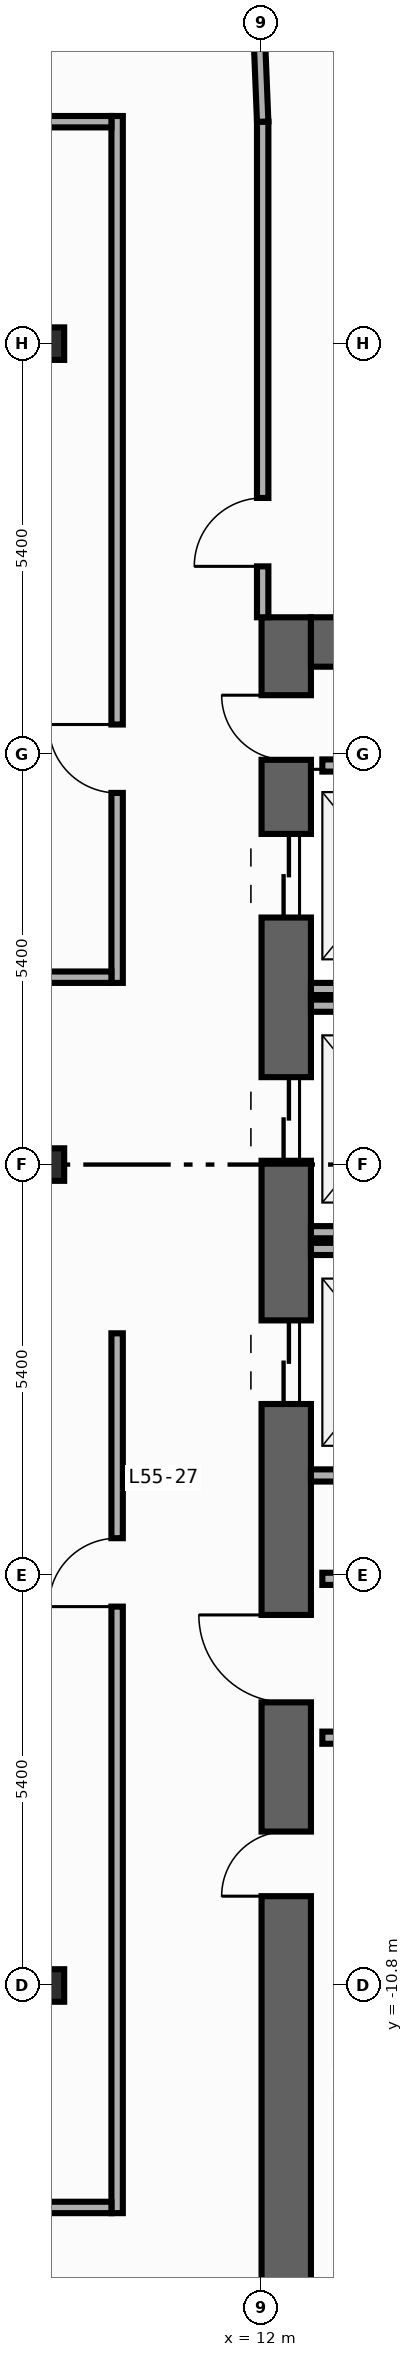
"""IFC4 building model, lengths in metres.
Left out: names, types, materials, properties, quantities, classifications, styles, units other than length and angle.
Written with IfcOpenShell. Run it as: python <this file> out.ifc"""

import sys

from ifc_helpers import new_model, si_unit, direction, frame, frame_2d, origin, origin_2d, place, context, subcontext, project, spatial, rectangle, i_section, extrude, element, fill, save


model = new_model("IFC4")
c1 = context("Model", 3, precision=1e-05, world=origin(), true_north=direction((0.0, 1.0)))
c2 = subcontext(c1, "Body", "Model", "MODEL_VIEW")
j1 = project(units=[si_unit("LENGTHUNIT", "METRE"), si_unit("PLANEANGLEUNIT", "RADIAN")], contexts=[c1])
p1 = place(None, origin())
s1 = spatial("IfcSite", under=j1, at=p1, CompositionType="ELEMENT")
p2 = place(p1, origin())
s2 = spatial("IfcBuilding", under=s1, at=p2, CompositionType="ELEMENT")
p3 = place(p2, frame((0.0, 0.0, 236.8)))
s3 = spatial("IfcBuildingStorey", under=s2, at=p3, CompositionType="ELEMENT", Elevation=236.8)
p4 = place(p3, frame((12.325, -19.8, 0.0), z_axis=(0.0, 0.0, 1.0), x_axis=(0.0, 1.0, 0.0)))
e1 = element("IfcWall", 1, at=p4, inside=s3, PredefinedType="SHEAR", context=c2, shape_type="SweptSolid", body=[
    extrude(rectangle(XDim=27.0, YDim=0.65, at=frame_2d((13.5, 0.0))), origin(), (0.0, 0.0, 1.0), 3.34),
])
p5 = place(p4, frame((23.05, 0.0, 0.0)))
e2 = element("IfcOpeningElement", 2, at=p5, cuts=e1, PredefinedType="OPENING", context=c2, shape_type="SweptSolid", body=[
    extrude(rectangle(XDim=1.1, YDim=2.2, at=frame_2d((0.55, 1.1))), frame((0.0, 0.335, 0.0), z_axis=(0.0, -1.0, 0.0), x_axis=(1.0, 0.0, 0.0)), (0.0, 0.0, 1.0), 0.67),
])
p6 = place(p4, frame((19.85, 0.0, 0.0)))
e3 = element("IfcOpeningElement", 3, at=p6, cuts=e1, PredefinedType="OPENING", context=c2, shape_type="SweptSolid", body=[
    extrude(rectangle(XDim=1.1, YDim=2.2, at=frame_2d((0.55, 1.1))), frame((0.0, 0.335, 0.0), z_axis=(0.0, -1.0, 0.0), x_axis=(1.0, 0.0, 0.0)), (0.0, 0.0, 1.0), 0.67),
])
p7 = place(p4, frame((16.65, 0.0, 0.0)))
e4 = element("IfcOpeningElement", 4, at=p7, cuts=e1, PredefinedType="OPENING", context=c2, shape_type="SweptSolid", body=[
    extrude(rectangle(XDim=1.1, YDim=2.2, at=frame_2d((0.55, 1.1))), frame((0.0, 0.335, 0.0), z_axis=(0.0, -1.0, 0.0), x_axis=(1.0, 0.0, 0.0)), (0.0, 0.0, 1.0), 0.67),
])
p8 = place(p4, frame((10.175, 0.0, 0.0)))
e5 = element("IfcOpeningElement", 5, at=p8, cuts=e1, PredefinedType="OPENING", context=c2, shape_type="SweptSolid", body=[
    extrude(rectangle(XDim=0.85, YDim=2.1, at=frame_2d((0.425, 1.05))), frame((0.0, 0.335, 0.0), z_axis=(0.0, -1.0, 0.0), x_axis=(1.0, 0.0, 0.0)), (0.0, 0.0, 1.0), 0.67),
])
p9 = place(p4, frame((12.725, 0.0, 0.0)))
e6 = element("IfcOpeningElement", 6, at=p9, cuts=e1, PredefinedType="OPENING", context=c2, shape_type="SweptSolid", body=[
    extrude(rectangle(XDim=1.15, YDim=2.2, at=frame_2d((0.575, 1.1))), frame((0.0, 0.335, 0.0), z_axis=(0.0, -1.0, 0.0), x_axis=(1.0, 0.0, 0.0)), (0.0, 0.0, 1.0), 0.67),
])
p10 = place(p4, frame((25.125, 0.0, 0.0)))
e7 = element("IfcOpeningElement", 7, at=p10, cuts=e1, PredefinedType="OPENING", context=c2, shape_type="SweptSolid", body=[
    extrude(rectangle(XDim=0.85, YDim=2.1, at=frame_2d((0.425, 1.05))), frame((0.0, 0.335, 0.0), z_axis=(0.0, -1.0, 0.0), x_axis=(1.0, 0.0, 0.0)), (0.0, 0.0, 1.0), 0.67),
])
p11 = place(p3, frame((12.65, 6.875, 0.0), z_axis=(0.0, 0.0, 1.0), x_axis=(1.0, 0.0, 0.0)))
e8 = element("IfcWall", 8, at=p11, inside=s3, PredefinedType="SHEAR", context=c2, shape_type="SweptSolid", body=[
    extrude(rectangle(XDim=7.1, YDim=0.65, at=frame_2d((3.55, 0.0))), origin(), (0.0, 0.0, 1.0), 3.34),
])
for number, where, z_axis, x_axis in (
    (9, (9.2, -10.8, 0.0), (0.0, 0.0, 1.0), (1.0, 0.0, 0.0)),
    (10, (9.2, 0.0, 0.0), (0.0, 0.0, 1.0), (1.0, 0.0, 0.0)),
    (11, (9.2, 10.8, 0.0), (0.0, 0.0, 1.0), (1.0, 0.0, 0.0)),
):
    element("IfcColumn", number, at=place(p3, frame(where, z_axis=z_axis, x_axis=x_axis)), inside=s3, PredefinedType="COLUMN", context=c2, shape_type="SweptSolid", body=[
        extrude(i_section(OverallWidth=0.407, OverallDepth=0.428, WebThickness=0.02, FlangeThickness=0.035, FilletRadius=0.022, at=origin_2d()), origin(), (0.0, 0.0, 1.0), 3.6),
    ])
for number, where, z_axis, x_axis in (
    (12, (12.65, 2.31, 0.0), (0.0, 0.0, 1.0), (1.0, 0.0, 0.0)),
    (13, (12.65, -0.89, 0.0), (0.0, 0.0, 1.0), (1.0, 0.0, 0.0)),
    (14, (12.65, 2.09, 0.0), (0.0, 0.0, 1.0), (1.0, 0.0, 0.0)),
    (15, (12.65, -4.09, 0.0), (0.0, 0.0, 1.0), (1.0, 0.0, 0.0)),
    (16, (12.65, -1.11, 0.0), (0.0, 0.0, 1.0), (1.0, 0.0, 0.0)),
):
    element("IfcWall", number, at=place(p3, frame(where, z_axis=z_axis, x_axis=x_axis)), inside=s3, PredefinedType="STANDARD", context=c2, shape_type="SweptSolid", body=[
        extrude(rectangle(XDim=2.34, YDim=0.16, at=frame_2d((1.17, 0.0))), origin(), (0.0, 0.0, 1.0), 3.34),
    ])
for number, where, z_axis, x_axis in (
    (17, (12.8, -5.45, 0.0), (0.0, 0.0, 1.0), (1.0, 0.0, 0.0)),
    (18, (12.8, -7.54, 0.0), (0.0, 0.0, 1.0), (1.0, 0.0, 0.0)),
    (19, (12.8, 5.25, 0.0), (0.0, 0.0, 1.0), (1.0, 0.0, 0.0)),
):
    element("IfcWall", number, at=place(p3, frame(where, z_axis=z_axis, x_axis=x_axis)), inside=s3, PredefinedType="STANDARD", context=c2, shape_type="SweptSolid", body=[
        extrude(rectangle(XDim=2.6, YDim=0.16, at=frame_2d((1.3, 0.0))), origin(), (0.0, 0.0, 1.0), 3.34),
    ])
p12 = place(p3, frame((12.015, 7.2, 0.0), z_axis=(0.0, 0.0, 1.0), x_axis=(0.0, 1.0, 0.0)))
e20 = element("IfcWall", 20, at=p12, inside=s3, PredefinedType="PARTITIONING", context=c2, shape_type="SweptSolid", body=[
    extrude(rectangle(XDim=6.52, YDim=0.15, at=frame_2d((3.26, 0.0))), origin(), (0.0, 0.0, 1.0), 3.34),
])
p13 = place(p12, frame((0.67, 0.0, 0.0)))
e21 = element("IfcOpeningElement", 21, at=p13, cuts=e20, PredefinedType="OPENING", context=c2, shape_type="SweptSolid", body=[
    extrude(rectangle(XDim=0.9, YDim=2.15, at=frame_2d((0.45, 1.075))), frame((0.0, 0.085, 0.0), z_axis=(0.0, -1.0, 0.0), x_axis=(1.0, 0.0, 0.0)), (0.0, 0.0, 1.0), 0.17),
])
p14 = place(p3, frame((10.1, 2.39, 0.0), z_axis=(0.0, 0.0, 1.0), x_axis=(0.0, 1.0, 0.0)))
e22 = element("IfcWall", 22, at=p14, inside=s3, PredefinedType="PARTITIONING", context=c2, shape_type="SweptSolid", body=[
    extrude(rectangle(XDim=11.405, YDim=0.15, at=frame_2d((5.703, 0.0))), origin(), (0.0, 0.0, 1.0), 3.34),
])
p15 = place(p14, frame((2.5, 0.0, 0.0)))
e23 = element("IfcOpeningElement", 23, at=p15, cuts=e22, PredefinedType="OPENING", context=c2, shape_type="SweptSolid", body=[
    extrude(rectangle(XDim=0.9, YDim=2.15, at=frame_2d((0.45, 1.075))), frame((0.0, 0.085, 0.0), z_axis=(0.0, -1.0, 0.0), x_axis=(1.0, 0.0, 0.0)), (0.0, 0.0, 1.0), 0.17),
])
p16 = place(p3, frame((10.1, -13.795, 0.0), z_axis=(0.0, 0.0, 1.0), x_axis=(0.0, 1.0, 0.0)))
e24 = element("IfcWall", 24, at=p16, inside=s3, PredefinedType="PARTITIONING", context=c2, shape_type="SweptSolid", body=[
    extrude(rectangle(XDim=11.575, YDim=0.15, at=frame_2d((5.788, 0.0))), origin(), (0.0, 0.0, 1.0), 3.34),
])
p17 = place(p16, frame((7.979, 0.0, 0.0)))
e25 = element("IfcOpeningElement", 25, at=p17, cuts=e24, PredefinedType="OPENING", context=c2, shape_type="SweptSolid", body=[
    extrude(rectangle(XDim=0.9, YDim=2.15, at=frame_2d((0.45, 1.075))), frame((0.0, 0.085, 0.0), z_axis=(0.0, -1.0, 0.0), x_axis=(1.0, 0.0, 0.0)), (0.0, 0.0, 1.0), 0.17),
])
p18 = place(p3, frame((2.77, 2.465, 0.0), z_axis=(0.0, 0.0, 1.0), x_axis=(1.0, 0.0, 0.0)))
e26 = element("IfcWall", 26, at=p18, inside=s3, PredefinedType="PARTITIONING", context=c2, shape_type="SweptSolid", body=[
    extrude(rectangle(XDim=7.255, YDim=0.15, at=frame_2d((3.627, 0.0))), origin(), (0.0, 0.0, 1.0), 3.34),
])
p19 = place(p18, frame((0.46, 0.0, 0.0)))
e27 = element("IfcOpeningElement", 27, at=p19, cuts=e26, PredefinedType="OPENING", context=c2, shape_type="SweptSolid", body=[
    extrude(rectangle(XDim=0.9, YDim=2.15, at=frame_2d((0.45, 1.075))), frame((0.0, 0.085, 0.0), z_axis=(0.0, -1.0, 0.0), x_axis=(1.0, 0.0, 0.0)), (0.0, 0.0, 1.0), 0.17),
])
p20 = place(p3, frame((12.015, 13.72, 0.0), z_axis=(0.0, 0.0, 1.0), x_axis=(-0.040046877756, 0.99919780203, 0.0)))
e28 = element("IfcWall", 28, at=p20, inside=s3, PredefinedType="PARTITIONING", context=c2, shape_type="SweptSolid", body=[
    extrude(rectangle(XDim=1.731, YDim=0.15, at=frame_2d((0.866, 0.0))), origin(), (0.0, 0.0, 1.0), 3.34),
])
p21 = place(p3, frame((2.77, 13.72, 0.0), z_axis=(0.0, 0.0, 1.0), x_axis=(1.0, 0.0, 0.0)))
e29 = element("IfcWall", 29, at=p21, inside=s3, PredefinedType="PARTITIONING", context=c2, shape_type="SweptSolid", body=[
    extrude(rectangle(XDim=7.255, YDim=0.15, at=frame_2d((3.627, 0.0))), origin(), (0.0, 0.0, 1.0), 3.34),
])
p22 = place(p21, frame((0.46, 0.0, 0.0)))
e30 = element("IfcOpeningElement", 30, at=p22, cuts=e29, PredefinedType="OPENING", context=c2, shape_type="SweptSolid", body=[
    extrude(rectangle(XDim=0.9, YDim=2.15, at=frame_2d((0.45, 1.075))), frame((0.0, 0.085, 0.0), z_axis=(0.0, -1.0, 0.0), x_axis=(1.0, 0.0, 0.0)), (0.0, 0.0, 1.0), 0.17),
])
p23 = place(p3, frame((2.94, -13.72, 0.0), z_axis=(0.0, 0.0, 1.0), x_axis=(1.0, 0.0, 0.0)))
e31 = element("IfcWall", 31, at=p23, inside=s3, PredefinedType="PARTITIONING", context=c2, shape_type="SweptSolid", body=[
    extrude(rectangle(XDim=7.085, YDim=0.15, at=frame_2d((3.542, 0.0))), origin(), (0.0, 0.0, 1.0), 3.34),
])
p24 = place(p23, frame((2.08, 0.0, 0.0)))
e32 = element("IfcOpeningElement", 32, at=p24, cuts=e31, PredefinedType="OPENING", context=c2, shape_type="SweptSolid", body=[
    extrude(rectangle(XDim=0.9, YDim=2.15, at=frame_2d((0.45, 1.075))), frame((0.0, 0.085, 0.0), z_axis=(0.0, -1.0, 0.0), x_axis=(1.0, 0.0, 0.0)), (0.0, 0.0, 1.0), 0.17),
])
p25 = place(p5, origin())
e33 = element("IfcDoor", 33, at=p25, inside=s3, OperationType="DOUBLE_DOOR_SLIDING", PredefinedType="DOOR", context=c2, shape_type="SweptSolid", body=[
    extrude(rectangle(XDim=1.1, YDim=2.2, at=frame_2d((0.55, 1.1))), frame((0.0, 0.025, 0.0), z_axis=(0.0, -1.0, 0.0), x_axis=(1.0, 0.0, 0.0)), (0.0, 0.0, 1.0), 0.05),
])
fill(e2, e33)
p26 = place(p6, origin())
e34 = element("IfcDoor", 34, at=p26, inside=s3, OperationType="DOUBLE_DOOR_SLIDING", PredefinedType="DOOR", context=c2, shape_type="SweptSolid", body=[
    extrude(rectangle(XDim=1.1, YDim=2.2, at=frame_2d((0.55, 1.1))), frame((0.0, 0.025, 0.0), z_axis=(0.0, -1.0, 0.0), x_axis=(1.0, 0.0, 0.0)), (0.0, 0.0, 1.0), 0.05),
])
fill(e3, e34)
p27 = place(p7, origin())
e35 = element("IfcDoor", 35, at=p27, inside=s3, OperationType="DOUBLE_DOOR_SLIDING", PredefinedType="DOOR", context=c2, shape_type="SweptSolid", body=[
    extrude(rectangle(XDim=1.1, YDim=2.2, at=frame_2d((0.55, 1.1))), frame((0.0, 0.025, 0.0), z_axis=(0.0, -1.0, 0.0), x_axis=(1.0, 0.0, 0.0)), (0.0, 0.0, 1.0), 0.05),
])
fill(e4, e35)
p28 = place(p8, origin())
e36 = element("IfcDoor", 36, at=p28, inside=s3, OperationType="SINGLE_SWING_LEFT", PredefinedType="DOOR", context=c2, shape_type="SweptSolid", body=[
    extrude(rectangle(XDim=0.85, YDim=2.1, at=frame_2d((0.425, 1.05))), frame((0.0, 0.025, 0.0), z_axis=(0.0, -1.0, 0.0), x_axis=(1.0, 0.0, 0.0)), (0.0, 0.0, 1.0), 0.05),
])
fill(e5, e36)
p29 = place(p9, origin())
e37 = element("IfcDoor", 37, at=p29, inside=s3, OperationType="SINGLE_SWING_RIGHT", PredefinedType="DOOR", context=c2, shape_type="SweptSolid", body=[
    extrude(rectangle(XDim=1.15, YDim=2.2, at=frame_2d((0.575, 1.1))), frame((0.0, 0.025, 0.0), z_axis=(0.0, -1.0, 0.0), x_axis=(1.0, 0.0, 0.0)), (0.0, 0.0, 1.0), 0.05),
])
fill(e6, e37)
p30 = place(p10, origin())
e38 = element("IfcDoor", 38, at=p30, inside=s3, OperationType="SINGLE_SWING_RIGHT", PredefinedType="DOOR", context=c2, shape_type="SweptSolid", body=[
    extrude(rectangle(XDim=0.85, YDim=2.1, at=frame_2d((0.425, 1.05))), frame((0.0, 0.025, 0.0), z_axis=(0.0, -1.0, 0.0), x_axis=(1.0, 0.0, 0.0)), (0.0, 0.0, 1.0), 0.05),
])
fill(e7, e38)
p31 = place(p13, origin())
e39 = element("IfcDoor", 39, at=p31, inside=s3, OperationType="SINGLE_SWING_LEFT", PredefinedType="DOOR", context=c2, shape_type="SweptSolid", body=[
    extrude(rectangle(XDim=0.9, YDim=2.15, at=frame_2d((0.45, 1.075))), frame((0.0, 0.025, 0.0), z_axis=(0.0, -1.0, 0.0), x_axis=(1.0, 0.0, 0.0)), (0.0, 0.0, 1.0), 0.05),
])
fill(e21, e39)
p32 = place(p15, origin())
e40 = element("IfcDoor", 40, at=p32, inside=s3, OperationType="SINGLE_SWING_RIGHT", PredefinedType="DOOR", context=c2, shape_type="SweptSolid", body=[
    extrude(rectangle(XDim=0.9, YDim=2.15, at=frame_2d((0.45, 1.075))), frame((0.0, 0.025, 0.0), z_axis=(0.0, -1.0, 0.0), x_axis=(1.0, 0.0, 0.0)), (0.0, 0.0, 1.0), 0.05),
])
fill(e23, e40)
p33 = place(p17, origin())
e41 = element("IfcDoor", 41, at=p33, inside=s3, OperationType="SINGLE_SWING_LEFT", PredefinedType="DOOR", context=c2, shape_type="SweptSolid", body=[
    extrude(rectangle(XDim=0.9, YDim=2.15, at=frame_2d((0.45, 1.075))), frame((0.0, 0.025, 0.0), z_axis=(0.0, -1.0, 0.0), x_axis=(1.0, 0.0, 0.0)), (0.0, 0.0, 1.0), 0.05),
])
fill(e25, e41)
save(model, sys.argv[1])
